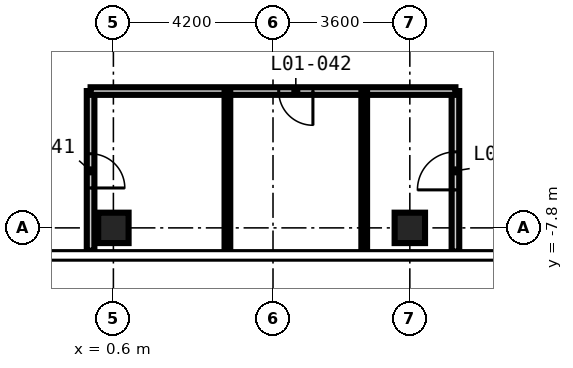
"""IFC4 building model, lengths in metres.
Left out: names, types, materials, properties, quantities, classifications, styles, units other than length and angle.
Written with IfcOpenShell. Run it as: python <this file> out.ifc"""

import sys

from ifc_helpers import new_model, si_unit, direction, frame, frame_2d, origin, origin_2d, place, context, subcontext, project, spatial, rectangle, extrude, element, fill, save


model = new_model("IFC4")
c1 = context("Model", 3, precision=1e-05, world=origin(), true_north=direction((0.0, 1.0)))
c2 = subcontext(c1, "Body", "Model", "MODEL_VIEW")
j1 = project(units=[si_unit("LENGTHUNIT", "METRE"), si_unit("PLANEANGLEUNIT", "RADIAN")], contexts=[c1])
p1 = place(None, origin())
s1 = spatial("IfcSite", under=j1, at=p1, CompositionType="ELEMENT")
p2 = place(p1, origin())
s2 = spatial("IfcBuilding", under=s1, at=p2, CompositionType="ELEMENT")
p3 = place(p2, frame((0.0, 0.0, 6.0)))
s3 = spatial("IfcBuildingStorey", under=s2, at=p3, CompositionType="ELEMENT", Elevation=6.0)
for number, where, z_axis, x_axis in (
    (1, (0.6, -7.8, -0.3), (0.0, 0.0, 1.0), (1.0, 0.0, 0.0)),
    (2, (8.4, -7.8, -0.3), (0.0, 0.0, 1.0), (1.0, 0.0, 0.0)),
):
    element("IfcColumn", number, at=place(p3, frame(where, z_axis=z_axis, x_axis=x_axis)), inside=s3, PredefinedType="COLUMN", context=c2, shape_type="SweptSolid", body=[
        extrude(rectangle(XDim=0.8, YDim=0.8, at=origin_2d()), origin(), (0.0, 0.0, 1.0), 6.0),
    ])
p4 = place(p3, frame((0.0, -8.4, 0.0), z_axis=(0.0, 0.0, 1.0), x_axis=(0.0, 1.0, 0.0)))
e3 = element("IfcWall", 3, at=p4, inside=s3, PredefinedType="PARTITIONING", context=c2, shape_type="SweptSolid", body=[
    extrude(rectangle(XDim=4.2, YDim=0.2, at=frame_2d((2.1, 0.0))), origin(), (0.0, 0.0, 1.0), 5.7),
])
p5 = place(p4, frame((1.65, 0.0, 0.0)))
e4 = element("IfcOpeningElement", 4, at=p5, cuts=e3, PredefinedType="OPENING", context=c2, shape_type="SweptSolid", body=[
    extrude(rectangle(XDim=0.9, YDim=2.1, at=frame_2d((0.45, 1.05))), frame((0.0, 0.11, 0.0), z_axis=(0.0, -1.0, 0.0), x_axis=(1.0, 0.0, 0.0)), (0.0, 0.0, 1.0), 0.22),
])
p6 = place(p3, frame((9.6, -8.423, 0.0), z_axis=(0.0, 0.0, 1.0), x_axis=(0.0, 1.0, 0.0)))
e5 = element("IfcWall", 5, at=p6, inside=s3, PredefinedType="PARTITIONING", context=c2, shape_type="SweptSolid", body=[
    extrude(rectangle(XDim=4.223, YDim=0.2, at=frame_2d((2.112, 0.0))), origin(), (0.0, 0.0, 1.0), 5.7),
])
p7 = place(p6, frame((1.623, 0.0, 0.0)))
e6 = element("IfcOpeningElement", 6, at=p7, cuts=e5, PredefinedType="OPENING", context=c2, shape_type="SweptSolid", body=[
    extrude(rectangle(XDim=1.0, YDim=2.1, at=frame_2d((0.5, 1.05))), frame((0.0, 0.11, 0.0), z_axis=(0.0, -1.0, 0.0), x_axis=(1.0, 0.0, 0.0)), (0.0, 0.0, 1.0), 0.22),
])
p8 = place(p3, frame((0.0, -4.2, 0.0), z_axis=(0.0, 0.0, 1.0), x_axis=(1.0, 0.0, 0.0)))
e7 = element("IfcWall", 7, at=p8, inside=s3, PredefinedType="PARTITIONING", context=c2, shape_type="SweptSolid", body=[
    extrude(rectangle(XDim=9.6, YDim=0.2, at=frame_2d((4.8, 0.0))), origin(), (0.0, 0.0, 1.0), 5.7),
])
p9 = place(p8, frame((4.95, 0.0, 0.0)))
e8 = element("IfcOpeningElement", 8, at=p9, cuts=e7, PredefinedType="OPENING", context=c2, shape_type="SweptSolid", body=[
    extrude(rectangle(XDim=0.9, YDim=2.1, at=frame_2d((0.45, 1.05))), frame((0.0, 0.11, 0.0), z_axis=(0.0, -1.0, 0.0), x_axis=(1.0, 0.0, 0.0)), (0.0, 0.0, 1.0), 0.22),
])
for number, where, z_axis, x_axis in (
    (9, (3.6, -8.423, 0.0), (0.0, 0.0, 1.0), (0.0, 1.0, 0.0)),
    (10, (7.2, -8.423, 0.0), (0.0, 0.0, 1.0), (0.0, 1.0, 0.0)),
):
    element("IfcWall", number, at=place(p3, frame(where, z_axis=z_axis, x_axis=x_axis)), inside=s3, PredefinedType="PARTITIONING", context=c2, shape_type="SweptSolid", body=[
        extrude(rectangle(XDim=4.223, YDim=0.15, at=frame_2d((2.112, 0.0))), origin(), (0.0, 0.0, 1.0), 5.7),
    ])
p10 = place(p5, frame((0.9, 0.0, 0.0), z_axis=(0.0, 0.0, 1.0), x_axis=(-1.0, 0.0, 0.0)))
e11 = element("IfcDoor", 11, at=p10, inside=s3, OperationType="SINGLE_SWING_RIGHT", PredefinedType="DOOR", context=c2, shape_type="SweptSolid", body=[
    extrude(rectangle(XDim=0.9, YDim=2.1, at=frame_2d((0.45, 1.05))), frame((0.0, 0.025, 0.0), z_axis=(0.0, -1.0, 0.0), x_axis=(1.0, 0.0, 0.0)), (0.0, 0.0, 1.0), 0.05),
])
fill(e4, e11)
p11 = place(p9, frame((0.9, 0.0, 0.0), z_axis=(0.0, 0.0, 1.0), x_axis=(-1.0, 0.0, 0.0)))
e12 = element("IfcDoor", 12, at=p11, inside=s3, OperationType="SINGLE_SWING_LEFT", PredefinedType="DOOR", context=c2, shape_type="SweptSolid", body=[
    extrude(rectangle(XDim=0.9, YDim=2.1, at=frame_2d((0.45, 1.05))), frame((0.0, 0.025, 0.0), z_axis=(0.0, -1.0, 0.0), x_axis=(1.0, 0.0, 0.0)), (0.0, 0.0, 1.0), 0.05),
])
fill(e8, e12)
p12 = place(p7, origin())
e13 = element("IfcDoor", 13, at=p12, inside=s3, OperationType="SINGLE_SWING_LEFT", PredefinedType="DOOR", context=c2, shape_type="SweptSolid", body=[
    extrude(rectangle(XDim=1.0, YDim=2.1, at=frame_2d((0.5, 1.05))), frame((0.0, 0.025, 0.0), z_axis=(0.0, -1.0, 0.0), x_axis=(1.0, 0.0, 0.0)), (0.0, 0.0, 1.0), 0.05),
])
fill(e6, e13)
save(model, sys.argv[1])
